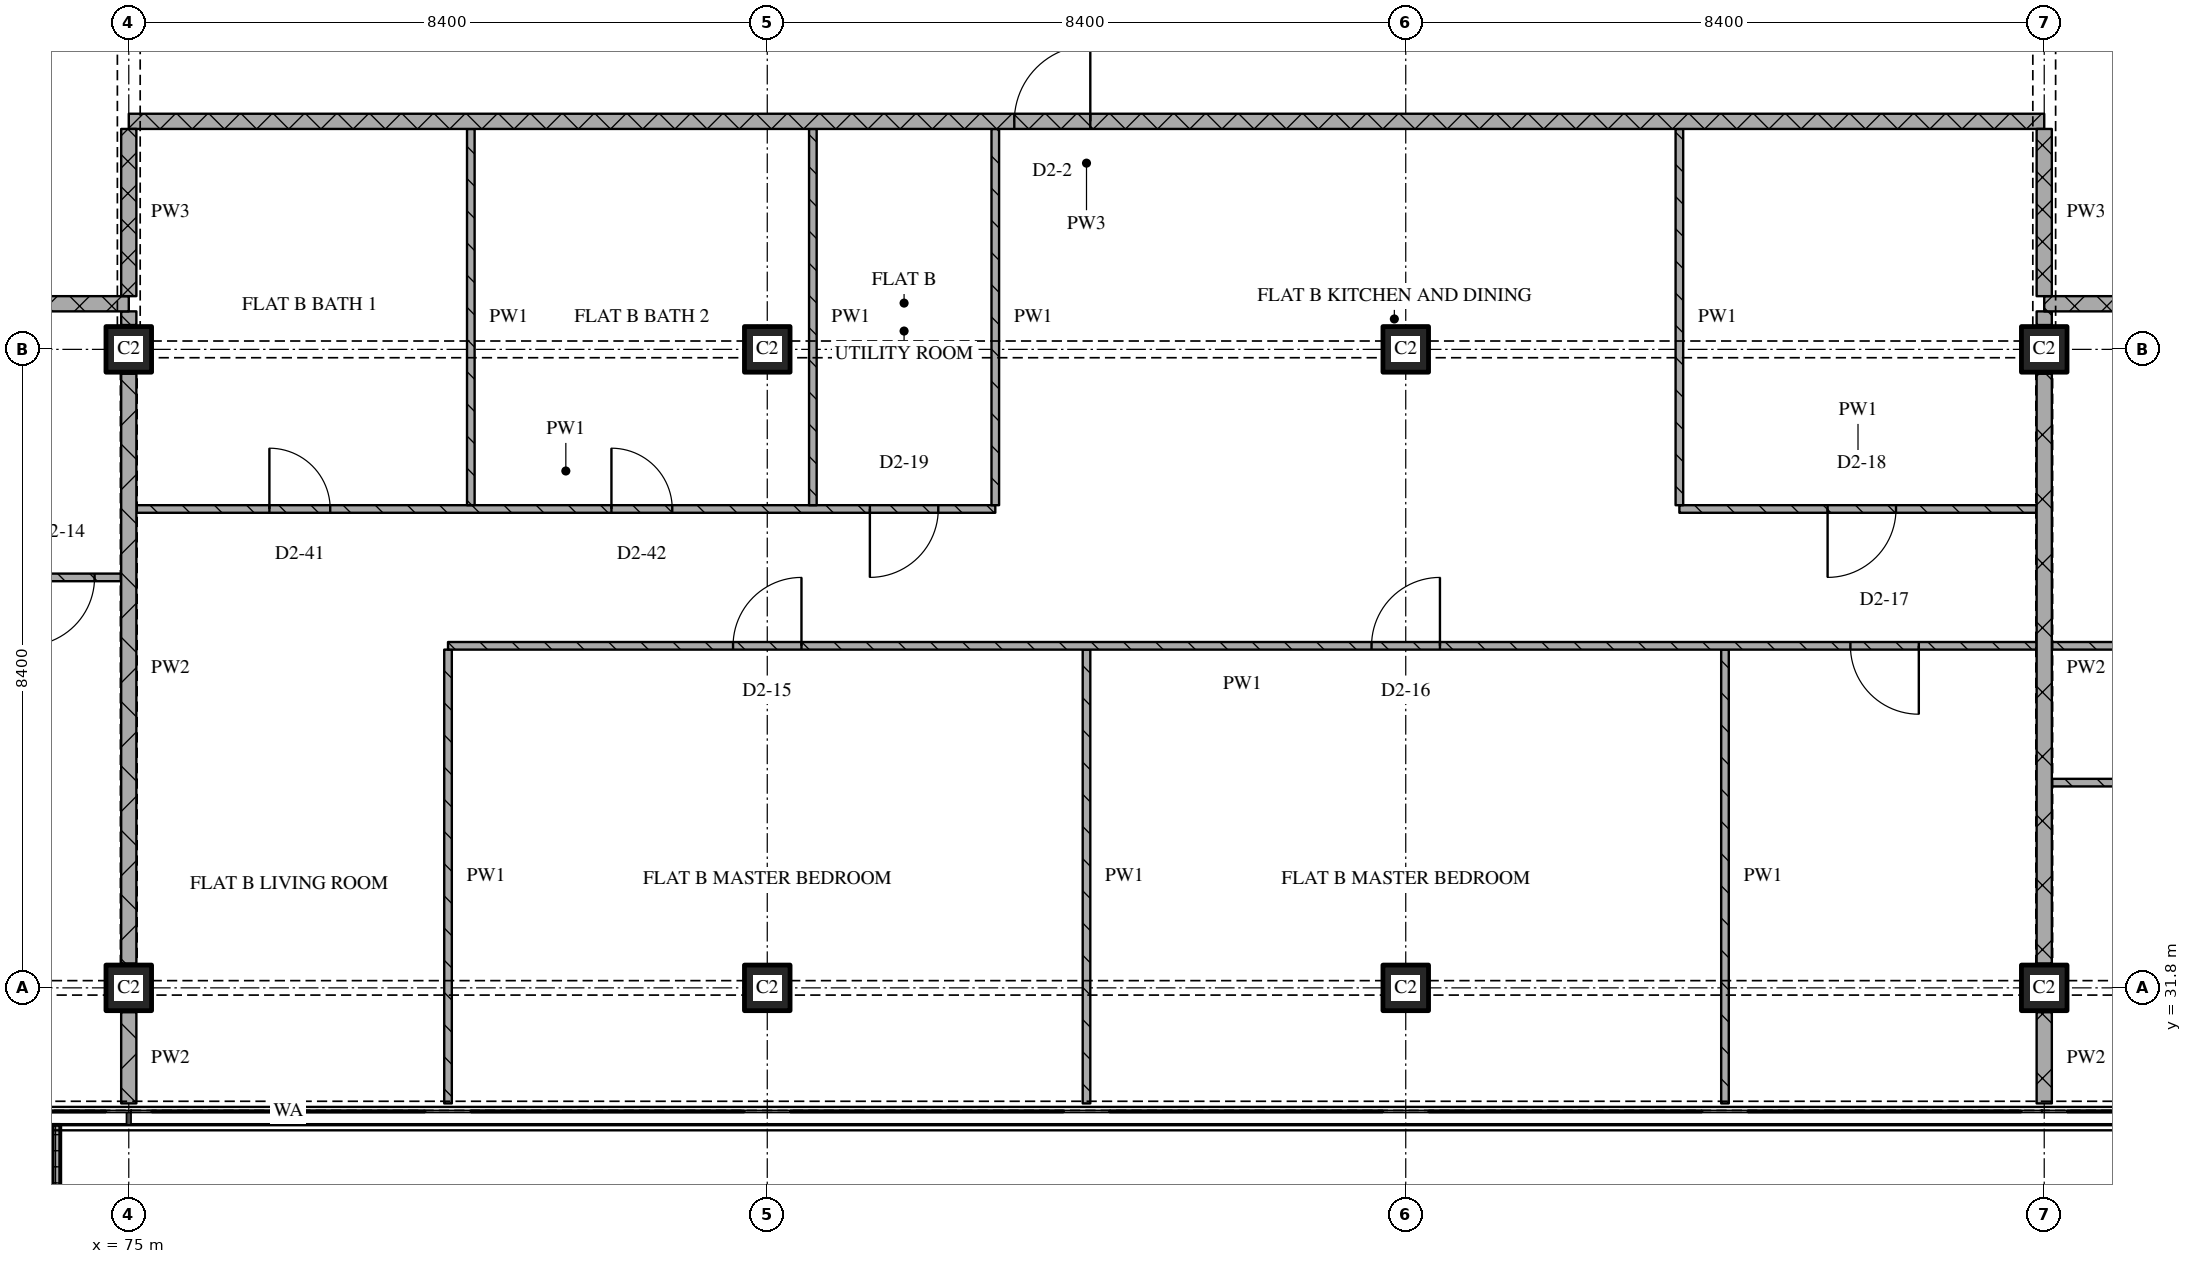
"""IFC4 building model, lengths in metres.
Left out: names, types, materials, properties, quantities, classifications, styles, units other than length and angle.
Written with IfcOpenShell. Run it as: python <this file> out.ifc"""

import sys

from ifc_helpers import new_model, si_unit, direction, frame, frame_2d, origin, origin_2d, place, context, subcontext, project, spatial, polyline, rectangle, outline, extrude, element, fill, save


model = new_model("IFC4")
c1 = context("Model", 3, precision=1e-05, world=origin(), true_north=direction((0.0, 1.0)))
c2 = subcontext(c1, "Body", "Model", "MODEL_VIEW")
j1 = project(units=[si_unit("LENGTHUNIT", "METRE"), si_unit("PLANEANGLEUNIT", "RADIAN")], contexts=[c1])
p1 = place(None, origin())
s1 = spatial("IfcSite", under=j1, at=p1, CompositionType="ELEMENT")
p2 = place(p1, origin())
s2 = spatial("IfcBuilding", under=s1, at=p2, CompositionType="ELEMENT")
p3 = place(p2, frame((0.0, 0.0, 216.3)))
s3 = spatial("IfcBuildingStorey", under=s2, at=p3, CompositionType="ELEMENT", Elevation=216.3)
for number, where, z_axis, x_axis in (
    (1, (75.0, 31.8, 0.0), (0.0, 0.0, 1.0), (1.0, 0.0, 0.0)),
    (2, (75.0, 40.2, 0.0), (0.0, 0.0, 1.0), (1.0, 0.0, 0.0)),
    (3, (83.4, 31.8, 0.0), (0.0, 0.0, 1.0), (1.0, 0.0, 0.0)),
    (4, (83.4, 40.2, 0.0), (0.0, 0.0, 1.0), (1.0, 0.0, 0.0)),
    (5, (91.8, 31.8, 0.0), (0.0, 0.0, 1.0), (1.0, 0.0, 0.0)),
    (6, (91.8, 40.2, 0.0), (0.0, 0.0, 1.0), (1.0, 0.0, 0.0)),
    (7, (100.2, 31.8, 0.0), (0.0, 0.0, 1.0), (1.0, 0.0, 0.0)),
    (8, (100.2, 40.2, 0.0), (0.0, 0.0, 1.0), (1.0, 0.0, 0.0)),
):
    element("IfcColumn", number, at=place(p3, frame(where, z_axis=z_axis, x_axis=x_axis)), inside=s3, PredefinedType="COLUMN", context=c2, shape_type="SweptSolid", body=[
        extrude(rectangle(XDim=0.6, YDim=0.6, at=origin_2d()), origin(), (0.0, 0.0, 1.0), 3.6),
    ])
p4 = place(p3, origin())
e9 = element("IfcWall", 9, at=p4, inside=s3, PredefinedType="SOLIDWALL", context=c2, shape_type="SweptSolid", body=[
    extrude(outline(polyline([(71.7, 30.0), (71.8, 30.0), (71.8, 28.5), (74.0, 28.5), (74.0, 30.0), (74.1, 30.0), (74.1, 28.4), (71.7, 28.4), (71.7, 30.0)])), origin(), (0.0, 0.0, 1.0), 1.0),
])
p5 = place(p3, frame((100.3, 34.5, 0.0), z_axis=(0.0, 0.0, 1.0), x_axis=(1.0, 0.0, 0.0)))
e10 = element("IfcWall", 10, at=p5, inside=s3, PredefinedType="PARTITIONING", context=c2, shape_type="SweptSolid", body=[
    extrude(rectangle(XDim=8.3, YDim=0.1, at=frame_2d((4.15, 0.0))), origin(), (0.0, 0.0, 1.0), 3.32),
])
p6 = place(p3, frame((64.2, 37.2, 0.0), z_axis=(0.0, 0.0, 1.0), x_axis=(1.0, 0.0, 0.0)))
e11 = element("IfcWall", 11, at=p6, inside=s3, PredefinedType="PARTITIONING", context=c2, shape_type="SweptSolid", body=[
    extrude(rectangle(XDim=10.7, YDim=0.1, at=frame_2d((5.35, 0.0))), origin(), (0.0, 0.0, 1.0), 3.32),
])
p7 = place(p6, frame((6.35, 0.0, 0.0)))
e12 = element("IfcOpeningElement", 12, at=p7, cuts=e11, PredefinedType="OPENING", context=c2, shape_type="SweptSolid", body=[
    extrude(rectangle(XDim=0.8, YDim=2.1, at=frame_2d((0.4, 1.05))), frame((0.0, 0.06, 0.0), z_axis=(0.0, -1.0, 0.0), x_axis=(1.0, 0.0, 0.0)), (0.0, 0.0, 1.0), 0.12),
])
p8 = place(p6, frame((9.45, 0.0, 0.0)))
e13 = element("IfcOpeningElement", 13, at=p8, cuts=e11, PredefinedType="OPENING", context=c2, shape_type="SweptSolid", body=[
    extrude(rectangle(XDim=0.9, YDim=2.1, at=frame_2d((0.45, 1.05))), frame((0.0, 0.06, 0.0), z_axis=(0.0, -1.0, 0.0), x_axis=(1.0, 0.0, 0.0)), (0.0, 0.0, 1.0), 0.12),
])
p9 = place(p3, frame((75.1, 38.1, 0.0), z_axis=(0.0, 0.0, 1.0), x_axis=(1.0, 0.0, 0.0)))
e14 = element("IfcWall", 14, at=p9, inside=s3, PredefinedType="PARTITIONING", context=c2, shape_type="SweptSolid", body=[
    extrude(rectangle(XDim=11.3, YDim=0.1, at=frame_2d((5.65, 0.0))), origin(), (0.0, 0.0, 1.0), 3.32),
])
p10 = place(p9, frame((1.75, 0.0, 0.0)))
e15 = element("IfcOpeningElement", 15, at=p10, cuts=e14, PredefinedType="OPENING", context=c2, shape_type="SweptSolid", body=[
    extrude(rectangle(XDim=0.8, YDim=2.1, at=frame_2d((0.4, 1.05))), frame((0.0, 0.06, 0.0), z_axis=(0.0, -1.0, 0.0), x_axis=(1.0, 0.0, 0.0)), (0.0, 0.0, 1.0), 0.12),
])
p11 = place(p9, frame((6.25, 0.0, 0.0)))
e16 = element("IfcOpeningElement", 16, at=p11, cuts=e14, PredefinedType="OPENING", context=c2, shape_type="SweptSolid", body=[
    extrude(rectangle(XDim=0.8, YDim=2.1, at=frame_2d((0.4, 1.05))), frame((0.0, 0.06, 0.0), z_axis=(0.0, -1.0, 0.0), x_axis=(1.0, 0.0, 0.0)), (0.0, 0.0, 1.0), 0.12),
])
p12 = place(p9, frame((9.65, 0.0, 0.0)))
e17 = element("IfcOpeningElement", 17, at=p12, cuts=e14, PredefinedType="OPENING", context=c2, shape_type="SweptSolid", body=[
    extrude(rectangle(XDim=0.9, YDim=2.1, at=frame_2d((0.45, 1.05))), frame((0.0, 0.06, 0.0), z_axis=(0.0, -1.0, 0.0), x_axis=(1.0, 0.0, 0.0)), (0.0, 0.0, 1.0), 0.12),
])
p13 = place(p3, frame((95.4, 38.1, 0.0), z_axis=(0.0, 0.0, 1.0), x_axis=(1.0, 0.0, 0.0)))
e18 = element("IfcWall", 18, at=p13, inside=s3, PredefinedType="PARTITIONING", context=c2, shape_type="SweptSolid", body=[
    extrude(rectangle(XDim=4.7, YDim=0.1, at=frame_2d((2.35, 0.0))), origin(), (0.0, 0.0, 1.0), 3.32),
])
p14 = place(p13, frame((1.95, 0.0, 0.0)))
e19 = element("IfcOpeningElement", 19, at=p14, cuts=e18, PredefinedType="OPENING", context=c2, shape_type="SweptSolid", body=[
    extrude(rectangle(XDim=0.9, YDim=2.1, at=frame_2d((0.45, 1.05))), frame((0.0, 0.06, 0.0), z_axis=(0.0, -1.0, 0.0), x_axis=(1.0, 0.0, 0.0)), (0.0, 0.0, 1.0), 0.12),
])
p15 = place(p3, frame((75.0, 40.8, 0.0), z_axis=(0.0, 0.0, 1.0), x_axis=(-1.0, 0.0, 0.0)))
e20 = element("IfcWall", 20, at=p15, inside=s3, PredefinedType="PARTITIONING", context=c2, shape_type="SweptSolid", body=[
    extrude(rectangle(XDim=24.38, YDim=0.2, at=frame_2d((12.19, 0.0))), origin(), (0.0, 0.0, 1.0), 3.32),
])
p16 = place(p15, frame((11.05, 0.0, 0.0)))
e21 = element("IfcOpeningElement", 21, at=p16, cuts=e20, PredefinedType="OPENING", context=c2, shape_type="SweptSolid", body=[
    extrude(rectangle(XDim=1.0, YDim=2.1, at=frame_2d((0.5, 1.05))), frame((0.0, 0.11, 0.0), z_axis=(0.0, -1.0, 0.0), x_axis=(1.0, 0.0, 0.0)), (0.0, 0.0, 1.0), 0.22),
])
p17 = place(p3, frame((124.58, 40.8, 0.0), z_axis=(0.0, 0.0, 1.0), x_axis=(-1.0, 0.0, 0.0)))
e22 = element("IfcWall", 22, at=p17, inside=s3, PredefinedType="PARTITIONING", context=c2, shape_type="SweptSolid", body=[
    extrude(rectangle(XDim=24.38, YDim=0.2, at=frame_2d((12.19, 0.0))), origin(), (0.0, 0.0, 1.0), 3.32),
])
p18 = place(p17, frame((14.43, 0.0, 0.0)))
e23 = element("IfcOpeningElement", 23, at=p18, cuts=e22, PredefinedType="OPENING", context=c2, shape_type="SweptSolid", body=[
    extrude(rectangle(XDim=1.0, YDim=2.1, at=frame_2d((0.5, 1.05))), frame((0.0, 0.11, 0.0), z_axis=(0.0, -1.0, 0.0), x_axis=(1.0, 0.0, 0.0)), (0.0, 0.0, 1.0), 0.22),
])
p19 = place(p3, frame((100.2, 43.2, 0.0), z_axis=(0.0, 0.0, 1.0), x_axis=(-1.0, 0.0, 0.0)))
e24 = element("IfcWall", 24, at=p19, inside=s3, PredefinedType="PARTITIONING", context=c2, shape_type="SweptSolid", body=[
    extrude(rectangle(XDim=25.2, YDim=0.2, at=frame_2d((12.6, 0.0))), origin(), (0.0, 0.0, 1.0), 3.32),
])
p20 = place(p19, frame((12.55, 0.0, 0.0)))
e25 = element("IfcOpeningElement", 25, at=p20, cuts=e24, PredefinedType="OPENING", context=c2, shape_type="SweptSolid", body=[
    extrude(rectangle(XDim=1.0, YDim=2.1, at=frame_2d((0.5, 1.05))), frame((0.0, 0.11, 0.0), z_axis=(0.0, -1.0, 0.0), x_axis=(1.0, 0.0, 0.0)), (0.0, 0.0, 1.0), 0.22),
])
p21 = place(p3, frame((75.0, 43.1, 0.0), z_axis=(0.0, 0.0, 1.0), x_axis=(0.0, -1.0, 0.0)))
e26 = element("IfcWall", 26, at=p21, inside=s3, PredefinedType="PARTITIONING", context=c2, shape_type="SweptSolid", body=[
    extrude(rectangle(XDim=2.2, YDim=0.2, at=frame_2d((1.1, 0.0))), origin(), (0.0, 0.0, 1.0), 2.53),
])
p22 = place(p3, frame((75.0, 31.48, 0.0), z_axis=(0.0, 0.0, 1.0), x_axis=(0.0, -1.0, 0.0)))
e27 = element("IfcWall", 27, at=p22, inside=s3, PredefinedType="PARTITIONING", context=c2, shape_type="SweptSolid", body=[
    extrude(rectangle(XDim=1.2, YDim=0.2, at=frame_2d((0.6, 0.0))), origin(), (0.0, 0.0, 1.0), 3.32),
])
p23 = place(p3, frame((75.0, 39.88, 0.0), z_axis=(0.0, 0.0, 1.0), x_axis=(0.0, -1.0, 0.0)))
e28 = element("IfcWall", 28, at=p23, inside=s3, PredefinedType="PARTITIONING", context=c2, shape_type="SweptSolid", body=[
    extrude(rectangle(XDim=7.76, YDim=0.2, at=frame_2d((3.88, 0.0))), origin(), (0.0, 0.0, 1.0), 2.72),
])
p24 = place(p3, frame((75.0, 40.7, 0.0), z_axis=(0.0, 0.0, 1.0), x_axis=(0.0, -1.0, 0.0)))
e29 = element("IfcWall", 29, at=p24, inside=s3, PredefinedType="PARTITIONING", context=c2, shape_type="SweptSolid", body=[
    extrude(rectangle(XDim=0.18, YDim=0.2, at=frame_2d((0.09, 0.0))), origin(), (0.0, 0.0, 1.0), 3.32),
])
p25 = place(p3, frame((79.2, 36.25, 0.0), z_axis=(0.0, 0.0, 1.0), x_axis=(0.0, -1.0, 0.0)))
e30 = element("IfcWall", 30, at=p25, inside=s3, PredefinedType="PARTITIONING", context=c2, shape_type="SweptSolid", body=[
    extrude(rectangle(XDim=5.97, YDim=0.1, at=frame_2d((2.985, 0.0))), origin(), (0.0, 0.0, 1.0), 3.32),
])
for number, where, z_axis, x_axis in (
    (31, (79.5, 43.1, 0.0), (0.0, 0.0, 1.0), (0.0, -1.0, 0.0)),
    (32, (84.0, 43.1, 0.0), (0.0, 0.0, 1.0), (0.0, -1.0, 0.0)),
    (33, (86.4, 43.1, 0.0), (0.0, 0.0, 1.0), (0.0, -1.0, 0.0)),
):
    element("IfcWall", number, at=place(p3, frame(where, z_axis=z_axis, x_axis=x_axis)), inside=s3, PredefinedType="PARTITIONING", context=c2, shape_type="SweptSolid", body=[
        extrude(rectangle(XDim=4.95, YDim=0.1, at=frame_2d((2.475, 0.0))), origin(), (0.0, 0.0, 1.0), 3.32),
    ])
p26 = place(p3, frame((87.6, 36.25, 0.0), z_axis=(0.0, 0.0, 1.0), x_axis=(0.0, -1.0, 0.0)))
e34 = element("IfcWall", 34, at=p26, inside=s3, PredefinedType="PARTITIONING", context=c2, shape_type="SweptSolid", body=[
    extrude(rectangle(XDim=5.97, YDim=0.1, at=frame_2d((2.985, 0.0))), origin(), (0.0, 0.0, 1.0), 3.32),
])
p27 = place(p3, frame((95.4, 43.1, 0.0), z_axis=(0.0, 0.0, 1.0), x_axis=(0.0, -1.0, 0.0)))
e35 = element("IfcWall", 35, at=p27, inside=s3, PredefinedType="PARTITIONING", context=c2, shape_type="SweptSolid", body=[
    extrude(rectangle(XDim=4.95, YDim=0.1, at=frame_2d((2.475, 0.0))), origin(), (0.0, 0.0, 1.0), 3.32),
])
p28 = place(p3, frame((96.0, 36.25, 0.0), z_axis=(0.0, 0.0, 1.0), x_axis=(0.0, -1.0, 0.0)))
e36 = element("IfcWall", 36, at=p28, inside=s3, PredefinedType="PARTITIONING", context=c2, shape_type="SweptSolid", body=[
    extrude(rectangle(XDim=5.97, YDim=0.1, at=frame_2d((2.985, 0.0))), origin(), (0.0, 0.0, 1.0), 3.32),
])
p29 = place(p3, frame((100.2, 43.1, 0.0), z_axis=(0.0, 0.0, 1.0), x_axis=(0.0, -1.0, 0.0)))
e37 = element("IfcWall", 37, at=p29, inside=s3, PredefinedType="PARTITIONING", context=c2, shape_type="SweptSolid", body=[
    extrude(rectangle(XDim=2.2, YDim=0.2, at=frame_2d((1.1, 0.0))), origin(), (0.0, 0.0, 1.0), 2.53),
])
p30 = place(p3, frame((100.2, 31.48, 0.0), z_axis=(0.0, 0.0, 1.0), x_axis=(0.0, -1.0, 0.0)))
e38 = element("IfcWall", 38, at=p30, inside=s3, PredefinedType="PARTITIONING", context=c2, shape_type="SweptSolid", body=[
    extrude(rectangle(XDim=1.2, YDim=0.2, at=frame_2d((0.6, 0.0))), origin(), (0.0, 0.0, 1.0), 3.32),
])
p31 = place(p3, frame((100.2, 39.88, 0.0), z_axis=(0.0, 0.0, 1.0), x_axis=(0.0, -1.0, 0.0)))
e39 = element("IfcWall", 39, at=p31, inside=s3, PredefinedType="PARTITIONING", context=c2, shape_type="SweptSolid", body=[
    extrude(rectangle(XDim=7.76, YDim=0.2, at=frame_2d((3.88, 0.0))), origin(), (0.0, 0.0, 1.0), 2.72),
])
p32 = place(p3, frame((100.2, 40.7, 0.0), z_axis=(0.0, 0.0, 1.0), x_axis=(0.0, -1.0, 0.0)))
e40 = element("IfcWall", 40, at=p32, inside=s3, PredefinedType="PARTITIONING", context=c2, shape_type="SweptSolid", body=[
    extrude(rectangle(XDim=0.18, YDim=0.2, at=frame_2d((0.09, 0.0))), origin(), (0.0, 0.0, 1.0), 3.32),
])
p33 = place(p3, frame((100.1, 36.3, 0.0), z_axis=(0.0, 0.0, 1.0), x_axis=(-1.0, 0.0, 0.0)))
e41 = element("IfcWall", 41, at=p33, inside=s3, PredefinedType="PARTITIONING", context=c2, shape_type="SweptSolid", body=[
    extrude(rectangle(XDim=20.9, YDim=0.1, at=frame_2d((10.45, 0.0))), origin(), (0.0, 0.0, 1.0), 3.32),
])
p34 = place(p33, frame((1.55, 0.0, 0.0)))
e42 = element("IfcOpeningElement", 42, at=p34, cuts=e41, PredefinedType="OPENING", context=c2, shape_type="SweptSolid", body=[
    extrude(rectangle(XDim=0.9, YDim=2.1, at=frame_2d((0.45, 1.05))), frame((0.0, 0.06, 0.0), z_axis=(0.0, -1.0, 0.0), x_axis=(1.0, 0.0, 0.0)), (0.0, 0.0, 1.0), 0.12),
])
p35 = place(p33, frame((7.85, 0.0, 0.0)))
e43 = element("IfcOpeningElement", 43, at=p35, cuts=e41, PredefinedType="OPENING", context=c2, shape_type="SweptSolid", body=[
    extrude(rectangle(XDim=0.9, YDim=2.1, at=frame_2d((0.45, 1.05))), frame((0.0, 0.06, 0.0), z_axis=(0.0, -1.0, 0.0), x_axis=(1.0, 0.0, 0.0)), (0.0, 0.0, 1.0), 0.12),
])
p36 = place(p33, frame((16.25, 0.0, 0.0)))
e44 = element("IfcOpeningElement", 44, at=p36, cuts=e41, PredefinedType="OPENING", context=c2, shape_type="SweptSolid", body=[
    extrude(rectangle(XDim=0.9, YDim=2.1, at=frame_2d((0.45, 1.05))), frame((0.0, 0.06, 0.0), z_axis=(0.0, -1.0, 0.0), x_axis=(1.0, 0.0, 0.0)), (0.0, 0.0, 1.0), 0.12),
])
p37 = place(p3, frame((100.3, 36.3, 0.0), z_axis=(0.0, 0.0, 1.0), x_axis=(1.0, 0.0, 0.0)))
e45 = element("IfcWall", 45, at=p37, inside=s3, PredefinedType="PARTITIONING", context=c2, shape_type="SweptSolid", body=[
    extrude(rectangle(XDim=8.6, YDim=0.1, at=frame_2d((4.3, 0.0))), origin(), (0.0, 0.0, 1.0), 3.32),
])
p38 = place(p37, frame((1.75, 0.0, 0.0)))
e46 = element("IfcOpeningElement", 46, at=p38, cuts=e45, PredefinedType="OPENING", context=c2, shape_type="SweptSolid", body=[
    extrude(rectangle(XDim=0.8, YDim=2.1, at=frame_2d((0.4, 1.05))), frame((0.0, 0.06, 0.0), z_axis=(0.0, -1.0, 0.0), x_axis=(1.0, 0.0, 0.0)), (0.0, 0.0, 1.0), 0.12),
])
p39 = place(p8, origin())
e47 = element("IfcDoor", 47, at=p39, inside=s3, OperationType="SINGLE_SWING_RIGHT", PredefinedType="DOOR", context=c2, shape_type="SweptSolid", body=[
    extrude(rectangle(XDim=0.9, YDim=2.1, at=frame_2d((0.45, 1.05))), frame((0.0, 0.025, 0.0), z_axis=(0.0, -1.0, 0.0), x_axis=(1.0, 0.0, 0.0)), (0.0, 0.0, 1.0), 0.05),
])
fill(e13, e47)
p40 = place(p10, origin())
e48 = element("IfcDoor", 48, at=p40, inside=s3, OperationType="SINGLE_SWING_LEFT", PredefinedType="DOOR", context=c2, shape_type="SweptSolid", body=[
    extrude(rectangle(XDim=0.8, YDim=2.1, at=frame_2d((0.4, 1.05))), frame((0.0, 0.025, 0.0), z_axis=(0.0, -1.0, 0.0), x_axis=(1.0, 0.0, 0.0)), (0.0, 0.0, 1.0), 0.05),
])
fill(e15, e48)
p41 = place(p11, origin())
e49 = element("IfcDoor", 49, at=p41, inside=s3, OperationType="SINGLE_SWING_LEFT", PredefinedType="DOOR", context=c2, shape_type="SweptSolid", body=[
    extrude(rectangle(XDim=0.8, YDim=2.1, at=frame_2d((0.4, 1.05))), frame((0.0, 0.025, 0.0), z_axis=(0.0, -1.0, 0.0), x_axis=(1.0, 0.0, 0.0)), (0.0, 0.0, 1.0), 0.05),
])
fill(e16, e49)
p42 = place(p12, origin())
e50 = element("IfcDoor", 50, at=p42, inside=s3, OperationType="SINGLE_SWING_RIGHT", PredefinedType="DOOR", context=c2, shape_type="SweptSolid", body=[
    extrude(rectangle(XDim=0.9, YDim=2.1, at=frame_2d((0.45, 1.05))), frame((0.0, 0.025, 0.0), z_axis=(0.0, -1.0, 0.0), x_axis=(1.0, 0.0, 0.0)), (0.0, 0.0, 1.0), 0.05),
])
fill(e17, e50)
p43 = place(p14, origin())
e51 = element("IfcDoor", 51, at=p43, inside=s3, OperationType="SINGLE_SWING_RIGHT", PredefinedType="DOOR", context=c2, shape_type="SweptSolid", body=[
    extrude(rectangle(XDim=0.9, YDim=2.1, at=frame_2d((0.45, 1.05))), frame((0.0, 0.025, 0.0), z_axis=(0.0, -1.0, 0.0), x_axis=(1.0, 0.0, 0.0)), (0.0, 0.0, 1.0), 0.05),
])
fill(e19, e51)
p44 = place(p20, origin())
e52 = element("IfcDoor", 52, at=p44, inside=s3, OperationType="SINGLE_SWING_RIGHT", PredefinedType="DOOR", context=c2, shape_type="SweptSolid", body=[
    extrude(rectangle(XDim=1.0, YDim=2.1, at=frame_2d((0.5, 1.05))), frame((0.0, 0.025, 0.0), z_axis=(0.0, -1.0, 0.0), x_axis=(1.0, 0.0, 0.0)), (0.0, 0.0, 1.0), 0.05),
])
fill(e25, e52)
p45 = place(p34, origin())
e53 = element("IfcDoor", 53, at=p45, inside=s3, OperationType="SINGLE_SWING_LEFT", PredefinedType="DOOR", context=c2, shape_type="SweptSolid", body=[
    extrude(rectangle(XDim=0.9, YDim=2.1, at=frame_2d((0.45, 1.05))), frame((0.0, 0.025, 0.0), z_axis=(0.0, -1.0, 0.0), x_axis=(1.0, 0.0, 0.0)), (0.0, 0.0, 1.0), 0.05),
])
fill(e42, e53)
p46 = place(p35, origin())
e54 = element("IfcDoor", 54, at=p46, inside=s3, OperationType="SINGLE_SWING_RIGHT", PredefinedType="DOOR", context=c2, shape_type="SweptSolid", body=[
    extrude(rectangle(XDim=0.9, YDim=2.1, at=frame_2d((0.45, 1.05))), frame((0.0, 0.025, 0.0), z_axis=(0.0, -1.0, 0.0), x_axis=(1.0, 0.0, 0.0)), (0.0, 0.0, 1.0), 0.05),
])
fill(e43, e54)
p47 = place(p36, origin())
e55 = element("IfcDoor", 55, at=p47, inside=s3, OperationType="SINGLE_SWING_RIGHT", PredefinedType="DOOR", context=c2, shape_type="SweptSolid", body=[
    extrude(rectangle(XDim=0.9, YDim=2.1, at=frame_2d((0.45, 1.05))), frame((0.0, 0.025, 0.0), z_axis=(0.0, -1.0, 0.0), x_axis=(1.0, 0.0, 0.0)), (0.0, 0.0, 1.0), 0.05),
])
fill(e44, e55)
save(model, sys.argv[1])
